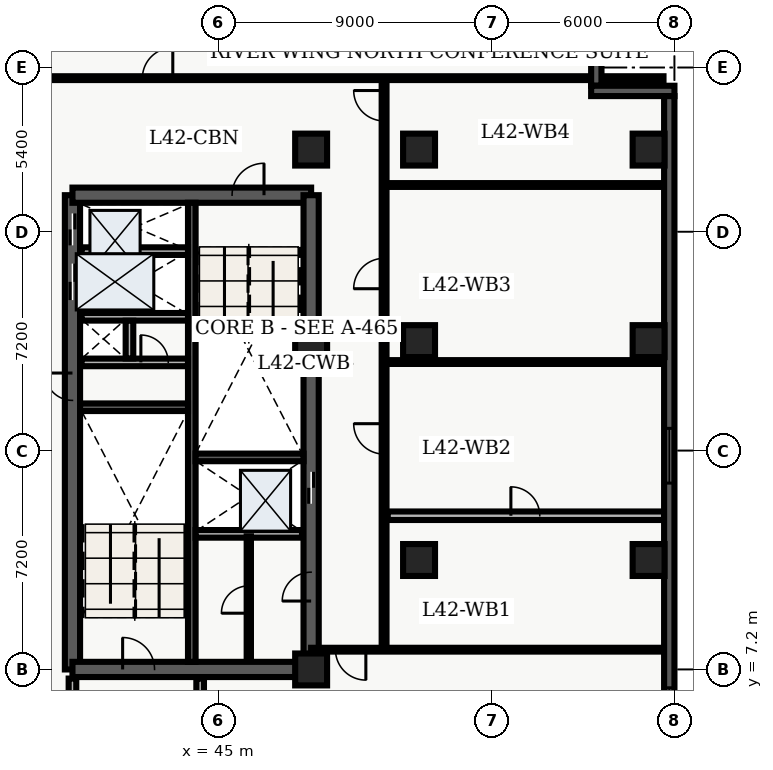
"""IFC4 building model, lengths in metres.
Left out: names, types, materials, properties, quantities, classifications, styles, units other than length and angle.
Written with IfcOpenShell. Run it as: python <this file> out.ifc"""

import sys

from ifc_helpers import new_model, entity, si_unit, converted_unit, direction, frame, origin_with_axes, origin_2d_with_axis, place, context, subcontext, project, spatial, polyline, rectangle, outline, extrude, element, fill, save


model = new_model("IFC4")
c1 = context("Model", 3, precision=1e-05, world=origin_with_axes(), true_north=direction((0.0, 1.0)))
c2 = subcontext(c1, "Body", "Model", "MODEL_VIEW")
j1 = project(units=[si_unit("LENGTHUNIT", "METRE"), converted_unit("PLANEANGLEUNIT", "DEGREE", entity("IfcPlaneAngleMeasure", 0.017), si_unit("PLANEANGLEUNIT", "RADIAN"), dimensions=[0, 0, 0, 0, 0, 0, 0])], contexts=[c1])
p1 = place(None, origin_with_axes())
s1 = spatial("IfcSite", under=j1, at=p1, CompositionType="ELEMENT")
p2 = place(p1, origin_with_axes())
s2 = spatial("IfcBuilding", under=s1, at=p2, CompositionType="ELEMENT")
p3 = place(p2, frame((0.0, 0.0, 171.9), z_axis=(0.0, 0.0, 1.0), x_axis=(1.0, 0.0, 0.0)))
s3 = spatial("IfcBuildingStorey", under=s2, at=p3, CompositionType="ELEMENT", Elevation=171.9)
p4 = place(p3, frame((40.2, 7.2, 0.0), z_axis=(0.0, 0.0, 1.0), x_axis=(0.0, 1.0, 0.0)))
e1 = element("IfcWall", 1, at=p4, inside=s3, PredefinedType="SHEAR", context=c2, shape_type="SweptSolid", body=[
    extrude(outline(polyline([(0.0, -0.25), (15.6, -0.25), (15.6, 0.25), (0.0, 0.25), (0.0, -0.25)])), origin_with_axes(), (0.0, 0.0, 1.0), 3.66),
])
p5 = place(p4, frame((14.475, 0.0, 0.0), z_axis=(0.0, 0.0, 1.0), x_axis=(1.0, 0.0, 0.0)))
e2 = element("IfcOpeningElement", 2, at=p5, cuts=e1, PredefinedType="OPENING", context=c2, shape_type="SweptSolid", body=[
    extrude(rectangle(XDim=1.05, YDim=0.52, at=origin_2d_with_axis()), origin_with_axes(), (0.0, 0.0, 1.0), 2.15),
])
p6 = place(p4, frame((12.75, 0.0, 0.0), z_axis=(0.0, 0.0, 1.0), x_axis=(1.0, 0.0, 0.0)))
e3 = element("IfcOpeningElement", 3, at=p6, cuts=e1, PredefinedType="OPENING", context=c2, shape_type="SweptSolid", body=[
    extrude(rectangle(XDim=1.2, YDim=0.52, at=origin_2d_with_axis()), origin_with_axes(), (0.0, 0.0, 1.0), 2.15),
])
p7 = place(p4, frame((9.3, 0.0, 0.0), z_axis=(0.0, 0.0, 1.0), x_axis=(1.0, 0.0, 0.0)))
e4 = element("IfcOpeningElement", 4, at=p7, cuts=e1, PredefinedType="OPENING", context=c2, shape_type="SweptSolid", body=[
    extrude(rectangle(XDim=0.9, YDim=0.52, at=origin_2d_with_axis()), origin_with_axes(), (0.0, 0.0, 1.0), 2.15),
])
p8 = place(p3, frame((40.2, 7.2, 0.0), z_axis=(0.0, 0.0, 1.0), x_axis=(1.0, 0.0, 0.0)))
e5 = element("IfcWall", 5, at=p8, inside=s3, PredefinedType="SHEAR", context=c2, shape_type="SweptSolid", body=[
    extrude(outline(polyline([(0.0, -0.25), (7.85, -0.25), (7.85, 0.25), (0.0, 0.25), (0.0, -0.25)])), origin_with_axes(), (0.0, 0.0, 1.0), 3.66),
])
p9 = place(p8, frame((2.175, 0.0, 0.0), z_axis=(0.0, 0.0, 1.0), x_axis=(1.0, 0.0, 0.0)))
e6 = element("IfcOpeningElement", 6, at=p9, cuts=e5, PredefinedType="OPENING", context=c2, shape_type="SweptSolid", body=[
    extrude(rectangle(XDim=1.05, YDim=0.52, at=origin_2d_with_axis()), origin_with_axes(), (0.0, 0.0, 1.0), 2.15),
])
p10 = place(p3, frame((40.2, 22.8, 0.0), z_axis=(0.0, 0.0, 1.0), x_axis=(1.0, 0.0, 0.0)))
e7 = element("IfcWall", 7, at=p10, inside=s3, PredefinedType="SHEAR", context=c2, shape_type="SweptSolid", body=[
    extrude(outline(polyline([(0.0, -0.25), (7.85, -0.25), (7.85, 0.25), (0.0, 0.25), (0.0, -0.25)])), origin_with_axes(), (0.0, 0.0, 1.0), 3.66),
])
p11 = place(p10, frame((5.775, 0.0, 0.0), z_axis=(0.0, 0.0, 1.0), x_axis=(1.0, 0.0, 0.0)))
e8 = element("IfcOpeningElement", 8, at=p11, cuts=e7, PredefinedType="OPENING", context=c2, shape_type="SweptSolid", body=[
    extrude(rectangle(XDim=1.05, YDim=0.52, at=origin_2d_with_axis()), origin_with_axes(), (0.0, 0.0, 1.0), 2.15),
])
p12 = place(p3, frame((48.05, 7.2, 0.0), z_axis=(0.0, 0.0, 1.0), x_axis=(0.0, 1.0, 0.0)))
e9 = element("IfcWall", 9, at=p12, inside=s3, PredefinedType="SHEAR", context=c2, shape_type="SweptSolid", body=[
    extrude(outline(polyline([(0.0, -0.25), (15.6, -0.25), (15.6, 0.25), (0.0, 0.25), (0.0, -0.25)])), origin_with_axes(), (0.0, 0.0, 1.0), 3.66),
])
p13 = place(p12, frame((5.975, 0.0, 0.0), z_axis=(0.0, 0.0, 1.0), x_axis=(1.0, 0.0, 0.0)))
e10 = element("IfcOpeningElement", 10, at=p13, cuts=e9, PredefinedType="OPENING", context=c2, shape_type="SweptSolid", body=[
    extrude(rectangle(XDim=1.05, YDim=0.52, at=origin_2d_with_axis()), origin_with_axes(), (0.0, 0.0, 1.0), 2.15),
])
p14 = place(p12, frame((2.725, 0.0, 0.0), z_axis=(0.0, 0.0, 1.0), x_axis=(1.0, 0.0, 0.0)))
e11 = element("IfcOpeningElement", 11, at=p14, cuts=e9, PredefinedType="OPENING", context=c2, shape_type="SweptSolid", body=[
    extrude(rectangle(XDim=0.95, YDim=0.52, at=origin_2d_with_axis()), origin_with_axes(), (0.0, 0.0, 1.0), 2.15),
])
p15 = place(p3, frame((44.125, 7.45, 0.0), z_axis=(0.0, 0.0, 1.0), x_axis=(0.0, 1.0, 0.0)))
e12 = element("IfcWall", 12, at=p15, inside=s3, PredefinedType="SHEAR", context=c2, shape_type="SweptSolid", body=[
    extrude(outline(polyline([(0.0, -0.125), (15.1, -0.125), (15.1, 0.125), (0.0, 0.125), (0.0, -0.125)])), origin_with_axes(), (0.0, 0.0, 1.0), 3.66),
])
for number, where, z_axis, x_axis in (
    (13, (40.45, 15.825, 0.0), (0.0, 0.0, 1.0), (1.0, 0.0, 0.0)),
    (14, (44.25, 14.175, 0.0), (0.0, 0.0, 1.0), (1.0, 0.0, 0.0)),
):
    element("IfcWall", number, at=place(p3, frame(where, z_axis=z_axis, x_axis=x_axis)), inside=s3, PredefinedType="SHEAR", context=c2, shape_type="SweptSolid", body=[
        extrude(outline(polyline([(0.0, -0.125), (3.55, -0.125), (3.55, 0.125), (0.0, 0.125), (0.0, -0.125)])), origin_with_axes(), (0.0, 0.0, 1.0), 3.66),
    ])
p16 = place(p3, frame((40.5, 17.3, 0.0), z_axis=(0.0, 0.0, 1.0), x_axis=(1.0, 0.0, 0.0)))
e15 = element("IfcWall", 15, at=p16, inside=s3, PredefinedType="SOLIDWALL", context=c2, shape_type="SweptSolid", body=[
    extrude(outline(polyline([(0.0, -0.125), (3.5, -0.125), (3.5, 0.125), (0.0, 0.125), (0.0, -0.125)])), origin_with_axes(), (0.0, 0.0, 1.0), 2.7),
])
p17 = place(p16, frame((2.4, 0.0, 0.0), z_axis=(0.0, 0.0, 1.0), x_axis=(1.0, 0.0, 0.0)))
e16 = element("IfcOpeningElement", 16, at=p17, cuts=e15, PredefinedType="OPENING", context=c2, shape_type="SweptSolid", body=[
    extrude(rectangle(XDim=0.9, YDim=0.27, at=origin_2d_with_axis()), origin_with_axes(), (0.0, 0.0, 1.0), 2.15),
])
p18 = place(p3, frame((40.5, 18.8, 0.0), z_axis=(0.0, 0.0, 1.0), x_axis=(1.0, 0.0, 0.0)))
e17 = element("IfcWall", 17, at=p18, inside=s3, PredefinedType="SOLIDWALL", context=c2, shape_type="SweptSolid", body=[
    extrude(outline(polyline([(0.0, -0.125), (3.5, -0.125), (3.5, 0.125), (0.0, 0.125), (0.0, -0.125)])), origin_with_axes(), (0.0, 0.0, 1.0), 2.7),
])
p19 = place(p3, frame((42.075, 17.43, 0.0), z_axis=(0.0, 0.0, 1.0), x_axis=(0.0, 1.0, 0.0)))
e18 = element("IfcWall", 18, at=p19, inside=s3, PredefinedType="SOLIDWALL", context=c2, shape_type="SweptSolid", body=[
    extrude(outline(polyline([(0.0, -0.125), (1.24, -0.125), (1.24, 0.125), (0.0, 0.125), (0.0, -0.125)])), origin_with_axes(), (0.0, 0.0, 1.0), 2.7),
])
p20 = place(p3, frame((40.2, 3.1, 0.0), z_axis=(0.0, 0.0, 1.0), x_axis=(0.0, 1.0, 0.0)))
e19 = element("IfcWall", 19, at=p20, inside=s3, PredefinedType="SOLIDWALL", context=c2, shape_type="SweptSolid", body=[
    extrude(outline(polyline([(0.0, -0.125), (3.8, -0.125), (3.8, 0.125), (0.0, 0.125), (0.0, -0.125)])), origin_with_axes(), (0.0, 0.0, 1.0), 2.7),
])
p21 = place(p20, frame((2.075, 0.0, 0.0), z_axis=(0.0, 0.0, 1.0), x_axis=(1.0, 0.0, 0.0)))
e20 = element("IfcOpeningElement", 20, at=p21, cuts=e19, PredefinedType="OPENING", context=c2, shape_type="SweptSolid", body=[
    extrude(rectangle(XDim=1.05, YDim=0.27, at=origin_2d_with_axis()), origin_with_axes(), (0.0, 0.0, 1.0), 2.15),
])
p22 = place(p3, frame((44.4, 3.1, 0.0), z_axis=(0.0, 0.0, 1.0), x_axis=(0.0, 1.0, 0.0)))
e21 = element("IfcWall", 21, at=p22, inside=s3, PredefinedType="SOLIDWALL", context=c2, shape_type="SweptSolid", body=[
    extrude(outline(polyline([(0.0, -0.125), (3.8, -0.125), (3.8, 0.125), (0.0, 0.125), (0.0, -0.125)])), origin_with_axes(), (0.0, 0.0, 1.0), 2.7),
])
for number, where, z_axis, x_axis in (
    (22, (48.05, 7.2, 0.0), (0.0, 0.0, 1.0), (1.0, 0.0, 0.0)),
    (23, (48.05, 18.0, 0.0), (0.0, 0.0, 1.0), (1.0, 0.0, 0.0)),
    (24, (48.05, 24.3, 0.0), (0.0, 0.0, 1.0), (1.0, 0.0, 0.0)),
    (25, (51.6, 10.8, 0.0), (0.0, 0.0, 1.0), (1.0, 0.0, 0.0)),
    (26, (51.6, 18.0, 0.0), (0.0, 0.0, 1.0), (1.0, 0.0, 0.0)),
    (27, (51.6, 24.3, 0.0), (0.0, 0.0, 1.0), (1.0, 0.0, 0.0)),
    (28, (59.15, 10.8, 0.0), (0.0, 0.0, 1.0), (1.0, 0.0, 0.0)),
    (29, (59.15, 18.0, 0.0), (0.0, 0.0, 1.0), (1.0, 0.0, 0.0)),
    (30, (59.15, 24.3, 0.0), (0.0, 0.0, 1.0), (1.0, 0.0, 0.0)),
):
    element("IfcColumn", number, at=place(p3, frame(where, z_axis=z_axis, x_axis=x_axis)), inside=s3, PredefinedType="COLUMN", context=c2, shape_type="SweptSolid", body=[
        extrude(rectangle(XDim=1.05, YDim=1.05, at=origin_2d_with_axis()), origin_with_axes(), (0.0, 0.0, 1.0), 3.9),
    ])
for number, where, z_axis, x_axis in (
    (31, (40.5, 20.96, 0.0), (0.0, 0.0, 1.0), (1.0, 0.0, 0.0)),
    (32, (44.25, 11.66, 0.0), (0.0, 0.0, 1.0), (1.0, 0.0, 0.0)),
):
    element("IfcWall", number, at=place(p3, frame(where, z_axis=z_axis, x_axis=x_axis)), inside=s3, PredefinedType="SOLIDWALL", context=c2, shape_type="SweptSolid", body=[
        extrude(outline(polyline([(0.0, -0.125), (3.5, -0.125), (3.5, 0.125), (0.0, 0.125), (0.0, -0.125)])), origin_with_axes(), (0.0, 0.0, 1.0), 2.7),
    ])
p23 = place(p3, frame((46.0, 7.5, 0.0), z_axis=(0.0, 0.0, 1.0), x_axis=(0.0, 1.0, 0.0)))
e33 = element("IfcWall", 33, at=p23, inside=s3, PredefinedType="PARTITIONING", context=c2, shape_type="SweptSolid", body=[
    extrude(outline(polyline([(0.0, -0.07), (4.08, -0.07), (4.08, 0.07), (0.0, 0.07), (0.0, -0.07)])), origin_with_axes(), (0.0, 0.0, 1.0), 2.7),
])
p24 = place(p23, frame((2.0, 0.0, 0.0), z_axis=(0.0, 0.0, 1.0), x_axis=(1.0, 0.0, 0.0)))
e34 = element("IfcOpeningElement", 34, at=p24, cuts=e33, PredefinedType="OPENING", context=c2, shape_type="SweptSolid", body=[
    extrude(rectangle(XDim=0.9, YDim=0.16, at=origin_2d_with_axis()), origin_with_axes(), (0.0, 0.0, 1.0), 2.15),
])
p25 = place(p3, frame((50.45, 7.85, 0.0), z_axis=(0.0, 0.0, 1.0), x_axis=(0.0, 1.0, 0.0)))
e35 = element("IfcWall", 35, at=p25, inside=s3, PredefinedType="PARTITIONING", context=c2, shape_type="SweptSolid", body=[
    extrude(outline(polyline([(0.0, -0.08), (18.8, -0.08), (18.8, 0.08), (0.0, 0.08), (0.0, -0.08)])), origin_with_axes(), (0.0, 0.0, 1.0), 2.7),
])
p26 = place(p25, frame((6.934, 0.0, 0.0), z_axis=(0.0, 0.0, 1.0), x_axis=(1.0, 0.0, 0.0)))
e36 = element("IfcOpeningElement", 36, at=p26, cuts=e35, PredefinedType="OPENING", context=c2, shape_type="SweptSolid", body=[
    extrude(rectangle(XDim=1.0, YDim=0.18, at=origin_2d_with_axis()), origin_with_axes(), (0.0, 0.0, 1.0), 2.15),
])
p27 = place(p25, frame((12.373, 0.0, 0.0), z_axis=(0.0, 0.0, 1.0), x_axis=(1.0, 0.0, 0.0)))
e37 = element("IfcOpeningElement", 37, at=p27, cuts=e35, PredefinedType="OPENING", context=c2, shape_type="SweptSolid", body=[
    extrude(rectangle(XDim=1.0, YDim=0.18, at=origin_2d_with_axis()), origin_with_axes(), (0.0, 0.0, 1.0), 2.15),
])
p28 = place(p25, frame((17.893, 0.0, 0.0), z_axis=(0.0, 0.0, 1.0), x_axis=(1.0, 0.0, 0.0)))
e38 = element("IfcOpeningElement", 38, at=p28, cuts=e35, PredefinedType="OPENING", context=c2, shape_type="SweptSolid", body=[
    extrude(rectangle(XDim=1.0, YDim=0.18, at=origin_2d_with_axis()), origin_with_axes(), (0.0, 0.0, 1.0), 2.15),
])
p29 = place(p3, frame((59.665, 7.85, 0.0), z_axis=(0.0, 0.0, 1.0), x_axis=(-1.0, 0.0, 0.0)))
e39 = element("IfcWall", 39, at=p29, inside=s3, PredefinedType="PARTITIONING", context=c2, shape_type="SweptSolid", body=[
    extrude(outline(polyline([(0.0, -0.062), (11.615, -0.062), (11.615, 0.062), (0.0, 0.062), (0.0, -0.062)])), origin_with_axes(), (0.0, 0.0, 1.0), 2.7),
])
p30 = place(p29, frame((10.315, 0.0, 0.0), z_axis=(0.0, 0.0, 1.0), x_axis=(1.0, 0.0, 0.0)))
e40 = element("IfcOpeningElement", 40, at=p30, cuts=e39, PredefinedType="OPENING", context=c2, shape_type="SweptSolid", body=[
    extrude(rectangle(XDim=1.0, YDim=0.145, at=origin_2d_with_axis()), origin_with_axes(), (0.0, 0.0, 1.0), 2.15),
])
p31 = place(p3, frame((38.735, 26.65, 0.0), z_axis=(0.0, 0.0, 1.0), x_axis=(1.0, 0.0, 0.0)))
e41 = element("IfcWall", 41, at=p31, inside=s3, PredefinedType="PARTITIONING", context=c2, shape_type="SweptSolid", body=[
    extrude(outline(polyline([(0.0, -0.062), (20.905, -0.062), (20.905, 0.062), (0.0, 0.062), (0.0, -0.062)])), origin_with_axes(), (0.0, 0.0, 1.0), 2.7),
])
p32 = place(p31, frame((4.265, 0.0, 0.0), z_axis=(0.0, 0.0, 1.0), x_axis=(1.0, 0.0, 0.0)))
e42 = element("IfcOpeningElement", 42, at=p32, cuts=e41, PredefinedType="OPENING", context=c2, shape_type="SweptSolid", body=[
    extrude(rectangle(XDim=1.0, YDim=0.145, at=origin_2d_with_axis()), origin_with_axes(), (0.0, 0.0, 1.0), 2.15),
])
p33 = place(p3, frame((50.57, 12.256, 0.0), z_axis=(0.0, 0.0, 1.0), x_axis=(1.0, 0.0, 0.0)))
e43 = element("IfcWall", 43, at=p33, inside=s3, PredefinedType="PARTITIONING", context=c2, shape_type="SweptSolid", body=[
    extrude(outline(polyline([(0.0, -0.14), (9.095, -0.14), (9.095, 0.14), (0.0, 0.14), (0.0, -0.14)])), origin_with_axes(), (0.0, 0.0, 1.0), 2.7),
])
p34 = place(p33, frame((4.525, 0.0, 0.0), z_axis=(0.0, 0.0, 1.0), x_axis=(1.0, 0.0, 0.0)))
e44 = element("IfcOpeningElement", 44, at=p34, cuts=e43, PredefinedType="OPENING", context=c2, shape_type="SweptSolid", body=[
    extrude(rectangle(XDim=0.95, YDim=0.3, at=origin_2d_with_axis()), origin_with_axes(), (0.0, 0.0, 1.0), 2.15),
])
for number, where, z_axis, x_axis in (
    (45, (50.57, 17.312, 0.0), (0.0, 0.0, 1.0), (1.0, 0.0, 0.0)),
    (46, (50.57, 23.135, 0.0), (0.0, 0.0, 1.0), (1.0, 0.0, 0.0)),
):
    element("IfcWall", number, at=place(p3, frame(where, z_axis=z_axis, x_axis=x_axis)), inside=s3, PredefinedType="PARTITIONING", context=c2, shape_type="SweptSolid", body=[
        extrude(outline(polyline([(0.0, -0.062), (9.095, -0.062), (9.095, 0.062), (0.0, 0.062), (0.0, -0.062)])), origin_with_axes(), (0.0, 0.0, 1.0), 2.7),
    ])
p35 = place(p3, frame((57.43, 28.46, 0.0), z_axis=(0.0, 0.0, 1.0), x_axis=(0.0, -1.0, 0.0)))
e47 = element("IfcWall", 47, at=p35, inside=s3, PredefinedType="SOLIDWALL", context=c2, shape_type="SweptSolid", body=[
    extrude(outline(polyline([(0.0, -0.17), (2.06, -0.17), (2.06, 0.17), (0.0, 0.17), (0.0, -0.17)])), origin_with_axes(), (0.0, 0.0, 1.0), 3.66),
])
p36 = place(p3, frame((57.26, 26.23, 0.0), z_axis=(0.0, 0.0, 1.0), x_axis=(1.0, 0.0, 0.0)))
e48 = element("IfcWall", 48, at=p36, inside=s3, PredefinedType="SOLIDWALL", context=c2, shape_type="SweptSolid", body=[
    extrude(outline(polyline([(0.0, -0.17), (2.74, -0.17), (2.74, 0.17), (0.0, 0.17), (0.0, -0.17)])), origin_with_axes(), (0.0, 0.0, 1.0), 3.66),
])
p37 = place(p3, frame((59.83, 26.06, 0.0), z_axis=(0.0, 0.0, 1.0), x_axis=(0.0, -1.0, 0.0)))
e49 = element("IfcWall", 49, at=p37, inside=s3, PredefinedType="SOLIDWALL", context=c2, shape_type="SweptSolid", body=[
    extrude(outline(polyline([(0.0, -0.17), (23.66, -0.17), (23.66, 0.17), (0.0, 0.17), (0.0, -0.17)])), origin_with_axes(), (0.0, 0.0, 1.0), 3.66),
])
p38 = place(p37, frame((11.83, 0.0, 0.45), z_axis=(0.0, 0.0, 1.0), x_axis=(1.0, 0.0, 0.0)))
e50 = element("IfcOpeningElement", 50, at=p38, cuts=e49, PredefinedType="OPENING", context=c2, shape_type="SweptSolid", body=[
    extrude(rectangle(XDim=1.8, YDim=0.36, at=origin_2d_with_axis()), origin_with_axes(), (0.0, 0.0, 1.0), 2.1),
])
p39 = place(p37, frame((20.364, 0.0, 0.45), z_axis=(0.0, 0.0, 1.0), x_axis=(1.0, 0.0, 0.0)))
e51 = element("IfcOpeningElement", 51, at=p39, cuts=e49, PredefinedType="OPENING", context=c2, shape_type="SweptSolid", body=[
    extrude(rectangle(XDim=1.8, YDim=0.36, at=origin_2d_with_axis()), origin_with_axes(), (0.0, 0.0, 1.0), 2.1),
])
p40 = place(p12, frame((5.975, 0.0, 0.0), z_axis=(0.0, 0.0, 1.0), x_axis=(1.0, 0.0, 0.0)))
e52 = element("IfcDoor", 52, at=p40, inside=s3, OperationType="SLIDING_TO_LEFT", PredefinedType="DOOR", context=c2, shape_type="SweptSolid", body=[
    extrude(rectangle(XDim=1.05, YDim=0.09, at=origin_2d_with_axis()), origin_with_axes(), (0.0, 0.0, 1.0), 2.15),
])
fill(e10, e52)
p41 = place(p4, frame((14.475, 0.0, 0.0), z_axis=(0.0, 0.0, 1.0), x_axis=(1.0, 0.0, 0.0)))
e53 = element("IfcDoor", 53, at=p41, inside=s3, OperationType="SLIDING_TO_RIGHT", PredefinedType="DOOR", context=c2, shape_type="SweptSolid", body=[
    extrude(rectangle(XDim=1.05, YDim=0.09, at=origin_2d_with_axis()), origin_with_axes(), (0.0, 0.0, 1.0), 2.15),
])
fill(e2, e53)
p42 = place(p4, frame((12.75, 0.0, 0.0), z_axis=(0.0, 0.0, 1.0), x_axis=(1.0, 0.0, 0.0)))
e54 = element("IfcDoor", 54, at=p42, inside=s3, OperationType="DOUBLE_DOOR_SLIDING", PredefinedType="DOOR", context=c2, shape_type="SweptSolid", body=[
    extrude(rectangle(XDim=1.2, YDim=0.09, at=origin_2d_with_axis()), origin_with_axes(), (0.0, 0.0, 1.0), 2.15),
])
fill(e3, e54)
p43 = place(p4, frame((9.3, 0.0, 0.0), z_axis=(0.0, 0.0, 1.0), x_axis=(1.0, 0.0, 0.0)))
e55 = element("IfcDoor", 55, at=p43, inside=s3, OperationType="SINGLE_SWING_RIGHT", PredefinedType="DOOR", context=c2, shape_type="SweptSolid", body=[
    extrude(rectangle(XDim=0.9, YDim=0.09, at=origin_2d_with_axis()), origin_with_axes(), (0.0, 0.0, 1.0), 2.15),
])
fill(e4, e55)
p44 = place(p16, frame((2.4, 0.0, 0.0), z_axis=(0.0, 0.0, 1.0), x_axis=(1.0, 0.0, 0.0)))
e56 = element("IfcDoor", 56, at=p44, inside=s3, OperationType="SINGLE_SWING_LEFT", PredefinedType="DOOR", context=c2, shape_type="SweptSolid", body=[
    extrude(rectangle(XDim=0.9, YDim=0.09, at=origin_2d_with_axis()), origin_with_axes(), (0.0, 0.0, 1.0), 2.15),
])
fill(e16, e56)
p45 = place(p8, frame((2.175, 0.0, 0.0), z_axis=(0.0, 0.0, 1.0), x_axis=(1.0, 0.0, 0.0)))
e57 = element("IfcDoor", 57, at=p45, inside=s3, OperationType="SINGLE_SWING_LEFT", PredefinedType="DOOR", context=c2, shape_type="SweptSolid", body=[
    extrude(rectangle(XDim=1.05, YDim=0.09, at=origin_2d_with_axis()), origin_with_axes(), (0.0, 0.0, 1.0), 2.15),
])
fill(e6, e57)
p46 = place(p10, frame((5.775, 0.0, 0.0), z_axis=(0.0, 0.0, 1.0), x_axis=(1.0, 0.0, 0.0)))
e58 = element("IfcDoor", 58, at=p46, inside=s3, OperationType="SINGLE_SWING_RIGHT", PredefinedType="DOOR", context=c2, shape_type="SweptSolid", body=[
    extrude(rectangle(XDim=1.05, YDim=0.09, at=origin_2d_with_axis()), origin_with_axes(), (0.0, 0.0, 1.0), 2.15),
])
fill(e8, e58)
p47 = place(p23, frame((2.0, 0.0, 0.0), z_axis=(0.0, 0.0, 1.0), x_axis=(1.0, 0.0, 0.0)))
e59 = element("IfcDoor", 59, at=p47, inside=s3, OperationType="SINGLE_SWING_LEFT", PredefinedType="DOOR", context=c2, shape_type="SweptSolid", body=[
    extrude(rectangle(XDim=0.9, YDim=0.084, at=origin_2d_with_axis()), origin_with_axes(), (0.0, 0.0, 1.0), 2.15),
])
fill(e34, e59)
p48 = place(p12, frame((2.725, 0.0, 0.0), z_axis=(0.0, 0.0, 1.0), x_axis=(1.0, 0.0, 0.0)))
e60 = element("IfcDoor", 60, at=p48, inside=s3, OperationType="SINGLE_SWING_LEFT", PredefinedType="DOOR", context=c2, shape_type="SweptSolid", body=[
    extrude(rectangle(XDim=0.95, YDim=0.09, at=origin_2d_with_axis()), origin_with_axes(), (0.0, 0.0, 1.0), 2.15),
])
fill(e11, e60)
p49 = place(p29, frame((10.315, 0.0, 0.0), z_axis=(0.0, 0.0, 1.0), x_axis=(1.0, 0.0, 0.0)))
e61 = element("IfcDoor", 61, at=p49, inside=s3, OperationType="SINGLE_SWING_LEFT", PredefinedType="DOOR", context=c2, shape_type="SweptSolid", body=[
    extrude(rectangle(XDim=1.0, YDim=0.075, at=origin_2d_with_axis()), origin_with_axes(), (0.0, 0.0, 1.0), 2.15),
])
fill(e40, e61)
p50 = place(p31, frame((4.265, 0.0, 0.0), z_axis=(0.0, 0.0, 1.0), x_axis=(1.0, 0.0, 0.0)))
e62 = element("IfcDoor", 62, at=p50, inside=s3, OperationType="SINGLE_SWING_RIGHT", PredefinedType="DOOR", context=c2, shape_type="SweptSolid", body=[
    extrude(rectangle(XDim=1.0, YDim=0.075, at=origin_2d_with_axis()), origin_with_axes(), (0.0, 0.0, 1.0), 2.15),
])
fill(e42, e62)
p51 = place(p33, frame((4.525, 0.0, 0.0), z_axis=(0.0, 0.0, 1.0), x_axis=(1.0, 0.0, 0.0)))
e63 = element("IfcDoor", 63, at=p51, inside=s3, OperationType="SINGLE_SWING_LEFT", PredefinedType="DOOR", context=c2, shape_type="SweptSolid", body=[
    extrude(rectangle(XDim=0.95, YDim=0.09, at=origin_2d_with_axis()), origin_with_axes(), (0.0, 0.0, 1.0), 2.15),
])
fill(e44, e63)
p52 = place(p25, frame((6.934, 0.0, 0.0), z_axis=(0.0, 0.0, 1.0), x_axis=(1.0, 0.0, 0.0)))
e64 = element("IfcDoor", 64, at=p52, inside=s3, OperationType="SINGLE_SWING_RIGHT", PredefinedType="DOOR", context=c2, shape_type="SweptSolid", body=[
    extrude(rectangle(XDim=1.0, YDim=0.09, at=origin_2d_with_axis()), origin_with_axes(), (0.0, 0.0, 1.0), 2.15),
])
fill(e36, e64)
p53 = place(p25, frame((12.373, 0.0, 0.0), z_axis=(0.0, 0.0, 1.0), x_axis=(1.0, 0.0, 0.0)))
e65 = element("IfcDoor", 65, at=p53, inside=s3, OperationType="SINGLE_SWING_LEFT", PredefinedType="DOOR", context=c2, shape_type="SweptSolid", body=[
    extrude(rectangle(XDim=1.0, YDim=0.09, at=origin_2d_with_axis()), origin_with_axes(), (0.0, 0.0, 1.0), 2.15),
])
fill(e37, e65)
p54 = place(p25, frame((17.893, 0.0, 0.0), z_axis=(0.0, 0.0, 1.0), x_axis=(1.0, 0.0, 0.0)))
e66 = element("IfcDoor", 66, at=p54, inside=s3, OperationType="SINGLE_SWING_RIGHT", PredefinedType="DOOR", context=c2, shape_type="SweptSolid", body=[
    extrude(rectangle(XDim=1.0, YDim=0.09, at=origin_2d_with_axis()), origin_with_axes(), (0.0, 0.0, 1.0), 2.15),
])
fill(e38, e66)
p55 = place(p37, frame((11.83, 0.0, 0.45), z_axis=(0.0, 0.0, 1.0), x_axis=(1.0, 0.0, 0.0)))
e67 = element("IfcWindow", 67, at=p55, inside=s3, PredefinedType="WINDOW", context=c2, shape_type="SweptSolid", body=[
    extrude(rectangle(XDim=1.8, YDim=0.09, at=origin_2d_with_axis()), origin_with_axes(), (0.0, 0.0, 1.0), 2.1),
])
fill(e50, e67)
p56 = place(p37, frame((20.364, 0.0, 0.45), z_axis=(0.0, 0.0, 1.0), x_axis=(1.0, 0.0, 0.0)))
e68 = element("IfcWindow", 68, at=p56, inside=s3, PredefinedType="WINDOW", context=c2, shape_type="SweptSolid", body=[
    extrude(rectangle(XDim=1.8, YDim=0.09, at=origin_2d_with_axis()), origin_with_axes(), (0.0, 0.0, 1.0), 2.1),
])
fill(e51, e68)
save(model, sys.argv[1])
